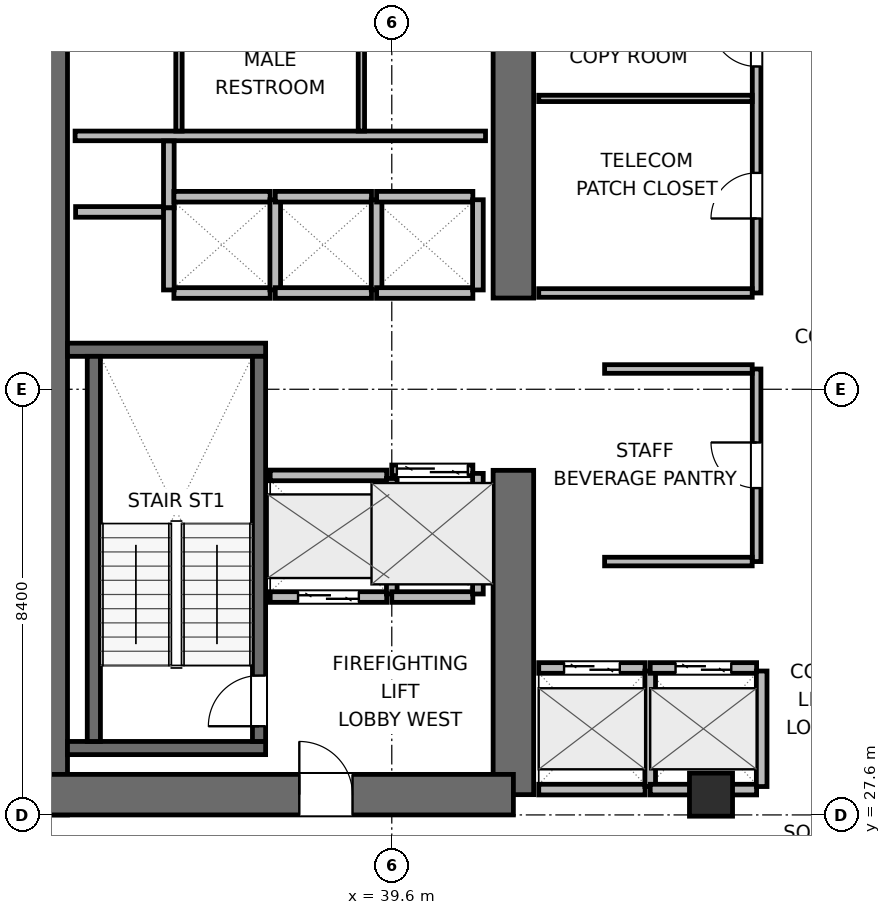
"""IFC4 building model, lengths in metres.
Left out: names, types, materials, properties, quantities, classifications, styles, units other than length and angle.
Written with IfcOpenShell. Run it as: python <this file> out.ifc"""

import sys

from ifc_helpers import new_model, si_unit, direction, frame, frame_2d, origin, origin_2d, place, context, subcontext, project, spatial, rectangle, extrude, element, fill, save


model = new_model("IFC4")
c1 = context("Model", 3, precision=1e-05, world=origin(), true_north=direction((0.0, 1.0)))
c2 = subcontext(c1, "Body", "Model", "MODEL_VIEW")
j1 = project(units=[si_unit("LENGTHUNIT", "METRE"), si_unit("PLANEANGLEUNIT", "RADIAN")], contexts=[c1])
p1 = place(None, origin())
s1 = spatial("IfcSite", under=j1, at=p1, CompositionType="ELEMENT")
p2 = place(p1, origin())
s2 = spatial("IfcBuilding", under=s1, at=p2, CompositionType="ELEMENT")
p3 = place(p2, frame((0.0, 0.0, 93.6)))
s3 = spatial("IfcBuildingStorey", under=s2, at=p3, CompositionType="ELEMENT", Elevation=93.6)
p4 = place(p3, frame((32.8, 27.6, 0.0), z_axis=(0.0, 0.0, 1.0), x_axis=(0.0, 1.0, 0.0)))
e1 = element("IfcWall", 1, at=p4, inside=s3, PredefinedType="SHEAR", context=c2, shape_type="SweptSolid", body=[
    extrude(rectangle(XDim=16.8, YDim=0.8, at=frame_2d((8.4, 0.0))), origin(), (0.0, 0.0, 1.0), 3.9),
])
p5 = place(p3, frame((42.0, 28.0, 0.0), z_axis=(0.0, 0.0, 1.0), x_axis=(0.0, 1.0, 0.0)))
e2 = element("IfcWall", 2, at=p5, inside=s3, PredefinedType="SHEAR", context=c2, shape_type="SweptSolid", body=[
    extrude(rectangle(XDim=6.4, YDim=0.8, at=frame_2d((3.2, 0.0))), origin(), (0.0, 0.0, 1.0), 3.9),
])
p6 = place(p3, frame((42.0, 37.8, 0.0), z_axis=(0.0, 0.0, 1.0), x_axis=(0.0, 1.0, 0.0)))
e3 = element("IfcWall", 3, at=p6, inside=s3, PredefinedType="SHEAR", context=c2, shape_type="SweptSolid", body=[
    extrude(rectangle(XDim=6.2, YDim=0.8, at=frame_2d((3.1, 0.0))), origin(), (0.0, 0.0, 1.0), 3.9),
])
p7 = place(p3, frame((32.8, 28.0, 0.0), z_axis=(0.0, 0.0, 1.0), x_axis=(1.0, 0.0, 0.0)))
e4 = element("IfcWall", 4, at=p7, inside=s3, PredefinedType="SHEAR", context=c2, shape_type="SweptSolid", body=[
    extrude(rectangle(XDim=9.2, YDim=0.8, at=frame_2d((4.6, 0.0))), origin(), (0.0, 0.0, 1.0), 3.9),
])
p8 = place(p7, frame((4.975, 0.0, 0.0)))
e5 = element("IfcOpeningElement", 5, at=p8, cuts=e4, PredefinedType="OPENING", context=c2, shape_type="SweptSolid", body=[
    extrude(rectangle(XDim=1.05, YDim=2.04, at=frame_2d((0.525, 1.02))), frame((0.0, 0.41, 0.0), z_axis=(0.0, -1.0, 0.0), x_axis=(1.0, 0.0, 0.0)), (0.0, 0.0, 1.0), 0.82),
])
for number, where, z_axis, x_axis in (
    (6, (33.2, 28.92, 0.0), (0.0, 0.0, 1.0), (1.0, 0.0, 0.0)),
    (7, (33.2, 36.78, 0.0), (0.0, 0.0, 1.0), (1.0, 0.0, 0.0)),
):
    element("IfcWall", number, at=place(p3, frame(where, z_axis=z_axis, x_axis=x_axis)), inside=s3, PredefinedType="SHEAR", context=c2, shape_type="SweptSolid", body=[
        extrude(rectangle(XDim=3.91, YDim=0.26, at=frame_2d((1.955, 0.0))), origin(), (0.0, 0.0, 1.0), 3.9),
    ])
p9 = place(p3, frame((33.72, 29.05, 0.0), z_axis=(0.0, 0.0, 1.0), x_axis=(0.0, 1.0, 0.0)))
e8 = element("IfcWall", 8, at=p9, inside=s3, PredefinedType="SHEAR", context=c2, shape_type="SweptSolid", body=[
    extrude(rectangle(XDim=7.6, YDim=0.26, at=frame_2d((3.8, 0.0))), origin(), (0.0, 0.0, 1.0), 3.9),
])
p10 = place(p3, frame((36.98, 29.05, 0.0), z_axis=(0.0, 0.0, 1.0), x_axis=(0.0, 1.0, 0.0)))
e9 = element("IfcWall", 9, at=p10, inside=s3, PredefinedType="SHEAR", context=c2, shape_type="SweptSolid", body=[
    extrude(rectangle(XDim=7.6, YDim=0.26, at=frame_2d((3.8, 0.0))), origin(), (0.0, 0.0, 1.0), 3.9),
])
p11 = place(p10, frame((0.3, 0.0, 0.0)))
e10 = element("IfcOpeningElement", 10, at=p11, cuts=e9, PredefinedType="OPENING", context=c2, shape_type="SweptSolid", body=[
    extrude(rectangle(XDim=1.0, YDim=2.04, at=frame_2d((0.5, 1.02))), frame((0.0, 0.14, 0.0), z_axis=(0.0, -1.0, 0.0), x_axis=(1.0, 0.0, 0.0)), (0.0, 0.0, 1.0), 0.28),
])
p12 = place(p3, frame((45.9, 28.0, 0.0), z_axis=(0.0, 0.0, 1.0), x_axis=(1.0, 0.0, 0.0)))
e11 = element("IfcColumn", 11, at=p12, inside=s3, PredefinedType="COLUMN", context=c2, shape_type="SweptSolid", body=[
    extrude(rectangle(XDim=0.85, YDim=0.85, at=origin_2d()), origin(), (0.0, 0.0, 1.0), 3.9),
])
p13 = place(p3, frame((33.35, 41.0, 0.0), z_axis=(0.0, 0.0, 1.0), x_axis=(1.0, 0.0, 0.0)))
e12 = element("IfcWall", 12, at=p13, inside=s3, PredefinedType="PLUMBINGWALL", context=c2, shape_type="SweptSolid", body=[
    extrude(rectangle(XDim=8.1, YDim=0.19, at=frame_2d((4.05, 0.0))), origin(), (0.0, 0.0, 1.0), 3.64),
])
for number, where, z_axis, x_axis in (
    (13, (35.4, 41.095, 0.0), (0.0, 0.0, 1.0), (0.0, 1.0, 0.0)),
    (14, (39.0, 41.095, 0.0), (0.0, 0.0, 1.0), (0.0, 1.0, 0.0)),
):
    element("IfcWall", number, at=place(p3, frame(where, z_axis=z_axis, x_axis=x_axis)), inside=s3, PredefinedType="PARTITIONING", context=c2, shape_type="SweptSolid", body=[
        extrude(rectangle(XDim=2.355, YDim=0.125, at=frame_2d((1.177, 0.0))), origin(), (0.0, 0.0, 1.0), 3.64),
    ])
p14 = place(p3, frame((33.36, 39.5, 0.0), z_axis=(0.0, 0.0, 1.0), x_axis=(1.0, 0.0, 0.0)))
e15 = element("IfcWall", 15, at=p14, inside=s3, PredefinedType="PARTITIONING", context=c2, shape_type="SweptSolid", body=[
    extrude(rectangle(XDim=1.86, YDim=0.21, at=frame_2d((0.93, 0.0))), origin(), (0.0, 0.0, 1.0), 3.64),
])
p15 = place(p3, frame((35.2, 39.58, 0.0), z_axis=(0.0, 0.0, 1.0), x_axis=(0.0, 1.0, 0.0)))
e16 = element("IfcWall", 16, at=p15, inside=s3, PredefinedType="PARTITIONING", context=c2, shape_type="SweptSolid", body=[
    extrude(rectangle(XDim=1.32, YDim=0.21, at=frame_2d((0.66, 0.0))), origin(), (0.0, 0.0, 1.0), 3.64),
])
p16 = place(p3, frame((37.2, 31.9, 0.0), z_axis=(0.0, 0.0, 1.0), x_axis=(1.0, 0.0, 0.0)))
e17 = element("IfcWall", 17, at=p16, inside=s3, PredefinedType="PARTITIONING", context=c2, shape_type="SweptSolid", body=[
    extrude(rectangle(XDim=2.3, YDim=0.21, at=frame_2d((1.15, 0.0))), origin(), (0.0, 0.0, 1.0), 3.64),
])
p17 = place(p16, frame((0.55, 0.0, 0.0)))
e18 = element("IfcOpeningElement", 18, at=p17, cuts=e17, PredefinedType="OPENING", context=c2, shape_type="SweptSolid", body=[
    extrude(rectangle(XDim=1.2, YDim=2.04, at=frame_2d((0.6, 1.02))), frame((0.0, 0.115, 0.0), z_axis=(0.0, -1.0, 0.0), x_axis=(1.0, 0.0, 0.0)), (0.0, 0.0, 1.0), 0.23),
])
p18 = place(p3, frame((37.2, 34.3, 0.0), z_axis=(0.0, 0.0, 1.0), x_axis=(1.0, 0.0, 0.0)))
e19 = element("IfcWall", 19, at=p18, inside=s3, PredefinedType="PARTITIONING", context=c2, shape_type="SweptSolid", body=[
    extrude(rectangle(XDim=2.3, YDim=0.21, at=frame_2d((1.15, 0.0))), origin(), (0.0, 0.0, 1.0), 3.64),
])
p19 = place(p3, frame((39.6, 31.96, 0.0), z_axis=(0.0, 0.0, 1.0), x_axis=(0.0, 1.0, 0.0)))
e20 = element("IfcWall", 20, at=p19, inside=s3, PredefinedType="PARTITIONING", context=c2, shape_type="SweptSolid", body=[
    extrude(rectangle(XDim=2.28, YDim=0.21, at=frame_2d((1.14, 0.0))), origin(), (0.0, 0.0, 1.0), 3.64),
])
p20 = place(p3, frame((39.6, 34.4, 0.0), z_axis=(0.0, 0.0, 1.0), x_axis=(1.0, 0.0, 0.0)))
e21 = element("IfcWall", 21, at=p20, inside=s3, PredefinedType="PARTITIONING", context=c2, shape_type="SweptSolid", body=[
    extrude(rectangle(XDim=1.6, YDim=0.21, at=frame_2d((0.8, 0.0))), origin(), (0.0, 0.0, 1.0), 3.64),
])
p21 = place(p20, frame((0.1, 0.0, 0.0)))
e22 = element("IfcOpeningElement", 22, at=p21, cuts=e21, PredefinedType="OPENING", context=c2, shape_type="SweptSolid", body=[
    extrude(rectangle(XDim=1.4, YDim=2.06, at=frame_2d((0.7, 1.03))), frame((0.0, 0.115, 0.0), z_axis=(0.0, -1.0, 0.0), x_axis=(1.0, 0.0, 0.0)), (0.0, 0.0, 1.0), 0.23),
])
p22 = place(p3, frame((39.6, 31.9, 0.0), z_axis=(0.0, 0.0, 1.0), x_axis=(1.0, 0.0, 0.0)))
e23 = element("IfcWall", 23, at=p22, inside=s3, PredefinedType="PARTITIONING", context=c2, shape_type="SweptSolid", body=[
    extrude(rectangle(XDim=1.6, YDim=0.21, at=frame_2d((0.8, 0.0))), origin(), (0.0, 0.0, 1.0), 3.64),
])
p23 = place(p3, frame((41.3, 31.96, 0.0), z_axis=(0.0, 0.0, 1.0), x_axis=(0.0, 1.0, 0.0)))
e24 = element("IfcWall", 24, at=p23, inside=s3, PredefinedType="PARTITIONING", context=c2, shape_type="SweptSolid", body=[
    extrude(rectangle(XDim=2.38, YDim=0.21, at=frame_2d((1.19, 0.0))), origin(), (0.0, 0.0, 1.0), 3.64),
])
p24 = place(p3, frame((42.5, 30.5, 0.0), z_axis=(0.0, 0.0, 1.0), x_axis=(1.0, 0.0, 0.0)))
e25 = element("IfcWall", 25, at=p24, inside=s3, PredefinedType="PARTITIONING", context=c2, shape_type="SweptSolid", body=[
    extrude(rectangle(XDim=2.1, YDim=0.21, at=frame_2d((1.05, 0.0))), origin(), (0.0, 0.0, 1.0), 3.64),
])
p25 = place(p24, frame((0.5, 0.0, 0.0)))
e26 = element("IfcOpeningElement", 26, at=p25, cuts=e25, PredefinedType="OPENING", context=c2, shape_type="SweptSolid", body=[
    extrude(rectangle(XDim=1.1, YDim=2.04, at=frame_2d((0.55, 1.02))), frame((0.0, 0.115, 0.0), z_axis=(0.0, -1.0, 0.0), x_axis=(1.0, 0.0, 0.0)), (0.0, 0.0, 1.0), 0.23),
])
p26 = place(p3, frame((42.5, 28.1, 0.0), z_axis=(0.0, 0.0, 1.0), x_axis=(1.0, 0.0, 0.0)))
e27 = element("IfcWall", 27, at=p26, inside=s3, PredefinedType="PARTITIONING", context=c2, shape_type="SweptSolid", body=[
    extrude(rectangle(XDim=2.1, YDim=0.21, at=frame_2d((1.05, 0.0))), origin(), (0.0, 0.0, 1.0), 2.525),
])
p27 = place(p3, frame((44.7, 28.16, 0.0), z_axis=(0.0, 0.0, 1.0), x_axis=(0.0, 1.0, 0.0)))
e28 = element("IfcWall", 28, at=p27, inside=s3, PredefinedType="PARTITIONING", context=c2, shape_type="SweptSolid", body=[
    extrude(rectangle(XDim=2.28, YDim=0.21, at=frame_2d((1.14, 0.0))), origin(), (0.0, 0.0, 1.0), 3.64),
])
p28 = place(p3, frame((44.7, 30.5, 0.0), z_axis=(0.0, 0.0, 1.0), x_axis=(1.0, 0.0, 0.0)))
e29 = element("IfcWall", 29, at=p28, inside=s3, PredefinedType="PARTITIONING", context=c2, shape_type="SweptSolid", body=[
    extrude(rectangle(XDim=2.1, YDim=0.21, at=frame_2d((1.05, 0.0))), origin(), (0.0, 0.0, 1.0), 3.64),
])
p29 = place(p28, frame((0.5, 0.0, 0.0)))
e30 = element("IfcOpeningElement", 30, at=p29, cuts=e29, PredefinedType="OPENING", context=c2, shape_type="SweptSolid", body=[
    extrude(rectangle(XDim=1.1, YDim=2.04, at=frame_2d((0.55, 1.02))), frame((0.0, 0.115, 0.0), z_axis=(0.0, -1.0, 0.0), x_axis=(1.0, 0.0, 0.0)), (0.0, 0.0, 1.0), 0.23),
])
p30 = place(p3, frame((44.7, 28.1, 0.0), z_axis=(0.0, 0.0, 1.0), x_axis=(1.0, 0.0, 0.0)))
e31 = element("IfcWall", 31, at=p30, inside=s3, PredefinedType="PARTITIONING", context=c2, shape_type="SweptSolid", body=[
    extrude(rectangle(XDim=2.1, YDim=0.21, at=frame_2d((1.05, 0.0))), origin(), (0.0, 0.0, 1.0), 2.525),
])
p31 = place(p3, frame((46.9, 28.16, 0.0), z_axis=(0.0, 0.0, 1.0), x_axis=(0.0, 1.0, 0.0)))
e32 = element("IfcWall", 32, at=p31, inside=s3, PredefinedType="PARTITIONING", context=c2, shape_type="SweptSolid", body=[
    extrude(rectangle(XDim=2.28, YDim=0.21, at=frame_2d((1.14, 0.0))), origin(), (0.0, 0.0, 1.0), 3.64),
])
for number, where, z_axis, x_axis in (
    (33, (35.3, 37.9, 0.0), (0.0, 0.0, 1.0), (1.0, 0.0, 0.0)),
    (34, (35.3, 39.8, 0.0), (0.0, 0.0, 1.0), (1.0, 0.0, 0.0)),
):
    element("IfcWall", number, at=place(p3, frame(where, z_axis=z_axis, x_axis=x_axis)), inside=s3, PredefinedType="PARTITIONING", context=c2, shape_type="SweptSolid", body=[
        extrude(rectangle(XDim=1.9, YDim=0.21, at=frame_2d((0.95, 0.0))), origin(), (0.0, 0.0, 1.0), 3.64),
    ])
p32 = place(p3, frame((35.2, 37.96, 0.0), z_axis=(0.0, 0.0, 1.0), x_axis=(0.0, 1.0, 0.0)))
e35 = element("IfcWall", 35, at=p32, inside=s3, PredefinedType="PARTITIONING", context=c2, shape_type="SweptSolid", body=[
    extrude(rectangle(XDim=1.62, YDim=0.21, at=frame_2d((0.81, 0.0))), origin(), (0.0, 0.0, 1.0), 3.64),
])
p33 = place(p3, frame((37.3, 37.96, 0.0), z_axis=(0.0, 0.0, 1.0), x_axis=(0.0, 1.0, 0.0)))
e36 = element("IfcWall", 36, at=p33, inside=s3, PredefinedType="PARTITIONING", context=c2, shape_type="SweptSolid", body=[
    extrude(rectangle(XDim=1.78, YDim=0.21, at=frame_2d((0.89, 0.0))), origin(), (0.0, 0.0, 1.0), 3.64),
])
for number, where, z_axis, x_axis in (
    (37, (37.3, 37.9, 0.0), (0.0, 0.0, 1.0), (1.0, 0.0, 0.0)),
    (38, (37.3, 39.8, 0.0), (0.0, 0.0, 1.0), (1.0, 0.0, 0.0)),
):
    element("IfcWall", number, at=place(p3, frame(where, z_axis=z_axis, x_axis=x_axis)), inside=s3, PredefinedType="PARTITIONING", context=c2, shape_type="SweptSolid", body=[
        extrude(rectangle(XDim=1.9, YDim=0.21, at=frame_2d((0.95, 0.0))), origin(), (0.0, 0.0, 1.0), 3.64),
    ])
p34 = place(p3, frame((39.3, 37.96, 0.0), z_axis=(0.0, 0.0, 1.0), x_axis=(0.0, 1.0, 0.0)))
e39 = element("IfcWall", 39, at=p34, inside=s3, PredefinedType="PARTITIONING", context=c2, shape_type="SweptSolid", body=[
    extrude(rectangle(XDim=1.78, YDim=0.21, at=frame_2d((0.89, 0.0))), origin(), (0.0, 0.0, 1.0), 3.64),
])
for number, where, z_axis, x_axis in (
    (40, (39.3, 37.9, 0.0), (0.0, 0.0, 1.0), (1.0, 0.0, 0.0)),
    (41, (39.3, 39.8, 0.0), (0.0, 0.0, 1.0), (1.0, 0.0, 0.0)),
):
    element("IfcWall", number, at=place(p3, frame(where, z_axis=z_axis, x_axis=x_axis)), inside=s3, PredefinedType="PARTITIONING", context=c2, shape_type="SweptSolid", body=[
        extrude(rectangle(XDim=1.9, YDim=0.21, at=frame_2d((0.95, 0.0))), origin(), (0.0, 0.0, 1.0), 3.64),
    ])
p35 = place(p3, frame((41.3, 37.96, 0.0), z_axis=(0.0, 0.0, 1.0), x_axis=(0.0, 1.0, 0.0)))
e42 = element("IfcWall", 42, at=p35, inside=s3, PredefinedType="PARTITIONING", context=c2, shape_type="SweptSolid", body=[
    extrude(rectangle(XDim=1.78, YDim=0.21, at=frame_2d((0.89, 0.0))), origin(), (0.0, 0.0, 1.0), 3.64),
])
p36 = place(p3, frame((46.8, 32.6, 0.0), z_axis=(0.0, 0.0, 1.0), x_axis=(0.0, 1.0, 0.0)))
e43 = element("IfcWall", 43, at=p36, inside=s3, PredefinedType="PARTITIONING", context=c2, shape_type="SweptSolid", body=[
    extrude(rectangle(XDim=3.8, YDim=0.17, at=frame_2d((1.9, 0.0))), origin(), (0.0, 0.0, 1.0), 3.64),
])
p37 = place(p36, frame((1.45, 0.0, 0.0)))
e44 = element("IfcOpeningElement", 44, at=p37, cuts=e43, PredefinedType="OPENING", context=c2, shape_type="SweptSolid", body=[
    extrude(rectangle(XDim=0.9, YDim=2.02, at=frame_2d((0.45, 1.01))), frame((0.0, 0.095, 0.0), z_axis=(0.0, -1.0, 0.0), x_axis=(1.0, 0.0, 0.0)), (0.0, 0.0, 1.0), 0.19),
])
for number, where, z_axis, x_axis in (
    (45, (43.8, 32.6, 0.0), (0.0, 0.0, 1.0), (1.0, 0.0, 0.0)),
    (46, (43.8, 36.4, 0.0), (0.0, 0.0, 1.0), (1.0, 0.0, 0.0)),
):
    element("IfcWall", number, at=place(p3, frame(where, z_axis=z_axis, x_axis=x_axis)), inside=s3, PredefinedType="PARTITIONING", context=c2, shape_type="SweptSolid", body=[
        extrude(rectangle(XDim=2.913, YDim=0.17, at=frame_2d((1.457, 0.0))), origin(), (0.0, 0.0, 1.0), 3.64),
    ])
p38 = place(p3, frame((46.8, 37.9, 0.0), z_axis=(0.0, 0.0, 1.0), x_axis=(0.0, 1.0, 0.0)))
e47 = element("IfcWall", 47, at=p38, inside=s3, PredefinedType="PARTITIONING", context=c2, shape_type="SweptSolid", body=[
    extrude(rectangle(XDim=6.0, YDim=0.17, at=frame_2d((3.0, 0.0))), origin(), (0.0, 0.0, 1.0), 3.64),
])
p39 = place(p38, frame((1.47, 0.0, 0.0)))
e48 = element("IfcOpeningElement", 48, at=p39, cuts=e47, PredefinedType="OPENING", context=c2, shape_type="SweptSolid", body=[
    extrude(rectangle(XDim=0.9, YDim=2.02, at=frame_2d((0.45, 1.01))), frame((0.0, 0.095, 0.0), z_axis=(0.0, -1.0, 0.0), x_axis=(1.0, 0.0, 0.0)), (0.0, 0.0, 1.0), 0.19),
])
p40 = place(p38, frame((4.47, 0.0, 0.0)))
e49 = element("IfcOpeningElement", 49, at=p40, cuts=e47, PredefinedType="OPENING", context=c2, shape_type="SweptSolid", body=[
    extrude(rectangle(XDim=0.9, YDim=2.02, at=frame_2d((0.45, 1.01))), frame((0.0, 0.095, 0.0), z_axis=(0.0, -1.0, 0.0), x_axis=(1.0, 0.0, 0.0)), (0.0, 0.0, 1.0), 0.19),
])
p41 = place(p3, frame((42.5, 37.9, 0.0), z_axis=(0.0, 0.0, 1.0), x_axis=(1.0, 0.0, 0.0)))
e50 = element("IfcWall", 50, at=p41, inside=s3, PredefinedType="PARTITIONING", context=c2, shape_type="SweptSolid", body=[
    extrude(rectangle(XDim=4.213, YDim=0.17, at=frame_2d((2.106, 0.0))), origin(), (0.0, 0.0, 1.0), 3.64),
])
p42 = place(p3, frame((42.5, 41.74, 0.0), z_axis=(0.0, 0.0, 1.0), x_axis=(1.0, 0.0, 0.0)))
e51 = element("IfcWall", 51, at=p42, inside=s3, PredefinedType="PARTITIONING", context=c2, shape_type="SweptSolid", body=[
    extrude(rectangle(XDim=4.213, YDim=0.125, at=frame_2d((2.106, 0.0))), origin(), (0.0, 0.0, 1.0), 3.64),
])
p43 = place(p11, origin())
e52 = element("IfcDoor", 52, at=p43, inside=s3, OperationType="SINGLE_SWING_LEFT", PredefinedType="DOOR", context=c2, shape_type="SweptSolid", body=[
    extrude(rectangle(XDim=1.0, YDim=2.04, at=frame_2d((0.5, 1.02))), frame((0.0, 0.025, 0.0), z_axis=(0.0, -1.0, 0.0), x_axis=(1.0, 0.0, 0.0)), (0.0, 0.0, 1.0), 0.05),
])
fill(e10, e52)
p44 = place(p17, origin())
e53 = element("IfcDoor", 53, at=p44, inside=s3, OperationType="DOUBLE_DOOR_SLIDING", PredefinedType="DOOR", context=c2, shape_type="SweptSolid", body=[
    extrude(rectangle(XDim=1.2, YDim=2.04, at=frame_2d((0.6, 1.02))), frame((0.0, 0.025, 0.0), z_axis=(0.0, -1.0, 0.0), x_axis=(1.0, 0.0, 0.0)), (0.0, 0.0, 1.0), 0.05),
])
fill(e18, e53)
p45 = place(p21, origin())
e54 = element("IfcDoor", 54, at=p45, inside=s3, OperationType="DOUBLE_DOOR_SLIDING", PredefinedType="DOOR", context=c2, shape_type="SweptSolid", body=[
    extrude(rectangle(XDim=1.4, YDim=2.06, at=frame_2d((0.7, 1.03))), frame((0.0, 0.025, 0.0), z_axis=(0.0, -1.0, 0.0), x_axis=(1.0, 0.0, 0.0)), (0.0, 0.0, 1.0), 0.05),
])
fill(e22, e54)
p46 = place(p25, origin())
e55 = element("IfcDoor", 55, at=p46, inside=s3, OperationType="DOUBLE_DOOR_SLIDING", PredefinedType="DOOR", context=c2, shape_type="SweptSolid", body=[
    extrude(rectangle(XDim=1.1, YDim=2.04, at=frame_2d((0.55, 1.02))), frame((0.0, 0.025, 0.0), z_axis=(0.0, -1.0, 0.0), x_axis=(1.0, 0.0, 0.0)), (0.0, 0.0, 1.0), 0.05),
])
fill(e26, e55)
p47 = place(p29, origin())
e56 = element("IfcDoor", 56, at=p47, inside=s3, OperationType="DOUBLE_DOOR_SLIDING", PredefinedType="DOOR", context=c2, shape_type="SweptSolid", body=[
    extrude(rectangle(XDim=1.1, YDim=2.04, at=frame_2d((0.55, 1.02))), frame((0.0, 0.025, 0.0), z_axis=(0.0, -1.0, 0.0), x_axis=(1.0, 0.0, 0.0)), (0.0, 0.0, 1.0), 0.05),
])
fill(e30, e56)
p48 = place(p8, origin())
e57 = element("IfcDoor", 57, at=p48, inside=s3, OperationType="SINGLE_SWING_LEFT", PredefinedType="DOOR", context=c2, shape_type="SweptSolid", body=[
    extrude(rectangle(XDim=1.05, YDim=2.04, at=frame_2d((0.525, 1.02))), frame((0.0, 0.025, 0.0), z_axis=(0.0, -1.0, 0.0), x_axis=(1.0, 0.0, 0.0)), (0.0, 0.0, 1.0), 0.05),
])
fill(e5, e57)
p49 = place(p37, origin())
e58 = element("IfcDoor", 58, at=p49, inside=s3, OperationType="SINGLE_SWING_RIGHT", PredefinedType="DOOR", context=c2, shape_type="SweptSolid", body=[
    extrude(rectangle(XDim=0.9, YDim=2.02, at=frame_2d((0.45, 1.01))), frame((0.0, 0.025, 0.0), z_axis=(0.0, -1.0, 0.0), x_axis=(1.0, 0.0, 0.0)), (0.0, 0.0, 1.0), 0.05),
])
fill(e44, e58)
p50 = place(p39, origin())
e59 = element("IfcDoor", 59, at=p50, inside=s3, OperationType="SINGLE_SWING_LEFT", PredefinedType="DOOR", context=c2, shape_type="SweptSolid", body=[
    extrude(rectangle(XDim=0.9, YDim=2.02, at=frame_2d((0.45, 1.01))), frame((0.0, 0.025, 0.0), z_axis=(0.0, -1.0, 0.0), x_axis=(1.0, 0.0, 0.0)), (0.0, 0.0, 1.0), 0.05),
])
fill(e48, e59)
p51 = place(p40, origin())
e60 = element("IfcDoor", 60, at=p51, inside=s3, OperationType="SINGLE_SWING_RIGHT", PredefinedType="DOOR", context=c2, shape_type="SweptSolid", body=[
    extrude(rectangle(XDim=0.9, YDim=2.02, at=frame_2d((0.45, 1.01))), frame((0.0, 0.025, 0.0), z_axis=(0.0, -1.0, 0.0), x_axis=(1.0, 0.0, 0.0)), (0.0, 0.0, 1.0), 0.05),
])
fill(e49, e60)
save(model, sys.argv[1])
